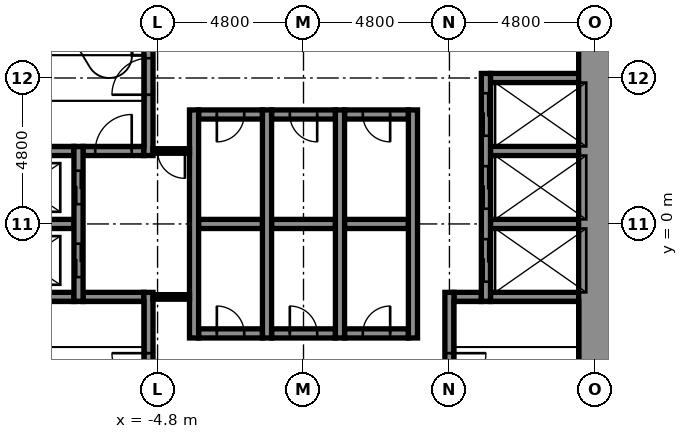
"""IFC4 building model, lengths in metres.
Left out: names, types, materials, properties, quantities, classifications, styles, units other than length and angle.
Written with IfcOpenShell. Run it as: python <this file> out.ifc"""

import sys

from ifc_helpers import new_model, si_unit, direction, frame, frame_2d, origin, place, context, subcontext, project, spatial, rectangle, extrude, element, fill, save


model = new_model("IFC4")
c1 = context("Model", 3, precision=1e-05, world=origin(), true_north=direction((0.0, 1.0)))
c2 = subcontext(c1, "Body", "Model", "MODEL_VIEW")
j1 = project(units=[si_unit("LENGTHUNIT", "METRE"), si_unit("PLANEANGLEUNIT", "RADIAN")], contexts=[c1])
p1 = place(None, origin())
s1 = spatial("IfcSite", under=j1, at=p1, CompositionType="ELEMENT")
p2 = place(p1, origin())
s2 = spatial("IfcBuilding", under=s1, at=p2, CompositionType="ELEMENT")
p3 = place(p2, origin())
s3 = spatial("IfcBuildingStorey", under=s2, at=p3, CompositionType="ELEMENT", Elevation=0.0)
p4 = place(p3, frame((-3.45, -3.6, -0.4), z_axis=(0.0, 0.0, 1.0), x_axis=(1.0, 0.0, 0.0)))
e1 = element("IfcWall", 1, at=p4, inside=s3, PredefinedType="STANDARD", context=c2, shape_type="SweptSolid", body=[
    extrude(rectangle(XDim=2.1, YDim=0.3, at=frame_2d((1.05, 0.0))), origin(), (0.0, 0.0, 1.0), 7.1),
])
p5 = place(p4, frame((0.6, 0.0, 0.4)))
e2 = element("IfcOpeningElement", 2, at=p5, cuts=e1, PredefinedType="OPENING", context=c2, shape_type="SweptSolid", body=[
    extrude(rectangle(XDim=0.9, YDim=2.1, at=frame_2d((0.45, 1.05))), frame((0.0, 0.16, 0.0), z_axis=(0.0, -1.0, 0.0), x_axis=(1.0, 0.0, 0.0)), (0.0, 0.0, 1.0), 0.32),
])
p6 = place(p3, frame((-1.05, -3.6, -0.4), z_axis=(0.0, 0.0, 1.0), x_axis=(1.0, 0.0, 0.0)))
e3 = element("IfcWall", 3, at=p6, inside=s3, PredefinedType="STANDARD", context=c2, shape_type="SweptSolid", body=[
    extrude(rectangle(XDim=2.1, YDim=0.3, at=frame_2d((1.05, 0.0))), origin(), (0.0, 0.0, 1.0), 7.1),
])
p7 = place(p6, frame((0.6, 0.0, 0.4)))
e4 = element("IfcOpeningElement", 4, at=p7, cuts=e3, PredefinedType="OPENING", context=c2, shape_type="SweptSolid", body=[
    extrude(rectangle(XDim=0.9, YDim=2.1, at=frame_2d((0.45, 1.05))), frame((0.0, 0.16, 0.0), z_axis=(0.0, -1.0, 0.0), x_axis=(1.0, 0.0, 0.0)), (0.0, 0.0, 1.0), 0.32),
])
p8 = place(p3, frame((1.35, -3.6, -0.4), z_axis=(0.0, 0.0, 1.0), x_axis=(1.0, 0.0, 0.0)))
e5 = element("IfcWall", 5, at=p8, inside=s3, PredefinedType="STANDARD", context=c2, shape_type="SweptSolid", body=[
    extrude(rectangle(XDim=2.1, YDim=0.3, at=frame_2d((1.05, 0.0))), origin(), (0.0, 0.0, 1.0), 7.1),
])
p9 = place(p8, frame((0.6, 0.0, 0.4)))
e6 = element("IfcOpeningElement", 6, at=p9, cuts=e5, PredefinedType="OPENING", context=c2, shape_type="SweptSolid", body=[
    extrude(rectangle(XDim=0.9, YDim=2.1, at=frame_2d((0.45, 1.05))), frame((0.0, 0.16, 0.0), z_axis=(0.0, -1.0, 0.0), x_axis=(1.0, 0.0, 0.0)), (0.0, 0.0, 1.0), 0.32),
])
p10 = place(p3, frame((-9.45, -2.4, -0.4), z_axis=(0.0, 0.0, 1.0), x_axis=(1.0, 0.0, 0.0)))
e7 = element("IfcWall", 7, at=p10, inside=s3, PredefinedType="STANDARD", context=c2, shape_type="SweptSolid", body=[
    extrude(rectangle(XDim=1.9, YDim=0.3, at=frame_2d((0.95, 0.0))), origin(), (0.0, 0.0, 1.0), 7.1),
])
p11 = place(p3, frame((-7.25, -2.4, -0.4), z_axis=(0.0, 0.0, 1.0), x_axis=(1.0, 0.0, 0.0)))
e8 = element("IfcWall", 8, at=p11, inside=s3, PredefinedType="STANDARD", context=c2, shape_type="SweptSolid", body=[
    extrude(rectangle(XDim=2.0, YDim=0.3, at=frame_2d((1.0, 0.0))), origin(), (0.0, 0.0, 1.0), 7.1),
])
p12 = place(p3, frame((4.95, -2.4, -0.4), z_axis=(0.0, 0.0, 1.0), x_axis=(1.0, 0.0, 0.0)))
e9 = element("IfcWall", 9, at=p12, inside=s3, PredefinedType="STANDARD", context=c2, shape_type="SweptSolid", body=[
    extrude(rectangle(XDim=0.9, YDim=0.3, at=frame_2d((0.45, 0.0))), origin(), (0.0, 0.0, 1.0), 7.1),
])
p13 = place(p3, frame((6.15, -2.4, -0.4), z_axis=(0.0, 0.0, 1.0), x_axis=(1.0, 0.0, 0.0)))
e10 = element("IfcWall", 10, at=p13, inside=s3, PredefinedType="STANDARD", context=c2, shape_type="SweptSolid", body=[
    extrude(rectangle(XDim=2.9, YDim=0.3, at=frame_2d((1.45, 0.0))), origin(), (0.0, 0.0, 1.0), 7.1),
])
p14 = place(p3, frame((-10.85, 0.0, -0.4), z_axis=(0.0, 0.0, 1.0), x_axis=(1.0, 0.0, 0.0)))
e11 = element("IfcWall", 11, at=p14, inside=s3, PredefinedType="STANDARD", context=c2, shape_type="SweptSolid", body=[
    extrude(rectangle(XDim=3.3, YDim=0.3, at=frame_2d((1.65, 0.0))), origin(), (0.0, 0.0, 1.0), 7.1),
])
p15 = place(p3, frame((-3.45, 0.0, -0.4), z_axis=(0.0, 0.0, 1.0), x_axis=(1.0, 0.0, 0.0)))
e12 = element("IfcWall", 12, at=p15, inside=s3, PredefinedType="STANDARD", context=c2, shape_type="SweptSolid", body=[
    extrude(rectangle(XDim=2.1, YDim=0.3, at=frame_2d((1.05, 0.0))), origin(), (0.0, 0.0, 1.0), 7.1),
])
p16 = place(p3, frame((-1.05, 0.0, -0.4), z_axis=(0.0, 0.0, 1.0), x_axis=(1.0, 0.0, 0.0)))
e13 = element("IfcWall", 13, at=p16, inside=s3, PredefinedType="STANDARD", context=c2, shape_type="SweptSolid", body=[
    extrude(rectangle(XDim=2.1, YDim=0.3, at=frame_2d((1.05, 0.0))), origin(), (0.0, 0.0, 1.0), 7.1),
])
p17 = place(p3, frame((1.35, 0.0, -0.4), z_axis=(0.0, 0.0, 1.0), x_axis=(1.0, 0.0, 0.0)))
e14 = element("IfcWall", 14, at=p17, inside=s3, PredefinedType="STANDARD", context=c2, shape_type="SweptSolid", body=[
    extrude(rectangle(XDim=2.1, YDim=0.3, at=frame_2d((1.05, 0.0))), origin(), (0.0, 0.0, 1.0), 7.1),
])
p18 = place(p3, frame((6.15, 0.0, -0.4), z_axis=(0.0, 0.0, 1.0), x_axis=(1.0, 0.0, 0.0)))
e15 = element("IfcWall", 15, at=p18, inside=s3, PredefinedType="STANDARD", context=c2, shape_type="SweptSolid", body=[
    extrude(rectangle(XDim=2.9, YDim=0.3, at=frame_2d((1.45, 0.0))), origin(), (0.0, 0.0, 1.0), 7.1),
])
p19 = place(p3, frame((-9.45, 2.4, -0.4), z_axis=(0.0, 0.0, 1.0), x_axis=(1.0, 0.0, 0.0)))
e16 = element("IfcWall", 16, at=p19, inside=s3, PredefinedType="STANDARD", context=c2, shape_type="SweptSolid", body=[
    extrude(rectangle(XDim=1.9, YDim=0.3, at=frame_2d((0.95, 0.0))), origin(), (0.0, 0.0, 1.0), 7.1),
])
p20 = place(p3, frame((-7.25, 2.4, -0.4), z_axis=(0.0, 0.0, 1.0), x_axis=(1.0, 0.0, 0.0)))
e17 = element("IfcWall", 17, at=p20, inside=s3, PredefinedType="STANDARD", context=c2, shape_type="SweptSolid", body=[
    extrude(rectangle(XDim=2.0, YDim=0.3, at=frame_2d((1.0, 0.0))), origin(), (0.0, 0.0, 1.0), 7.1),
])
p21 = place(p20, frame((0.4, 0.0, 0.4)))
e18 = element("IfcOpeningElement", 18, at=p21, cuts=e17, PredefinedType="OPENING", context=c2, shape_type="SweptSolid", body=[
    extrude(rectangle(XDim=1.2, YDim=2.1, at=frame_2d((0.6, 1.05))), frame((0.0, 0.16, 0.0), z_axis=(0.0, -1.0, 0.0), x_axis=(1.0, 0.0, 0.0)), (0.0, 0.0, 1.0), 0.32),
])
p22 = place(p3, frame((6.15, 2.4, -0.4), z_axis=(0.0, 0.0, 1.0), x_axis=(1.0, 0.0, 0.0)))
e19 = element("IfcWall", 19, at=p22, inside=s3, PredefinedType="STANDARD", context=c2, shape_type="SweptSolid", body=[
    extrude(rectangle(XDim=2.9, YDim=0.3, at=frame_2d((1.45, 0.0))), origin(), (0.0, 0.0, 1.0), 7.1),
])
p23 = place(p3, frame((-3.45, 3.6, -0.4), z_axis=(0.0, 0.0, 1.0), x_axis=(1.0, 0.0, 0.0)))
e20 = element("IfcWall", 20, at=p23, inside=s3, PredefinedType="STANDARD", context=c2, shape_type="SweptSolid", body=[
    extrude(rectangle(XDim=2.1, YDim=0.3, at=frame_2d((1.05, 0.0))), origin(), (0.0, 0.0, 1.0), 7.1),
])
p24 = place(p23, frame((0.6, 0.0, 0.4)))
e21 = element("IfcOpeningElement", 21, at=p24, cuts=e20, PredefinedType="OPENING", context=c2, shape_type="SweptSolid", body=[
    extrude(rectangle(XDim=0.9, YDim=2.1, at=frame_2d((0.45, 1.05))), frame((0.0, 0.16, 0.0), z_axis=(0.0, -1.0, 0.0), x_axis=(1.0, 0.0, 0.0)), (0.0, 0.0, 1.0), 0.32),
])
p25 = place(p3, frame((-1.05, 3.6, -0.4), z_axis=(0.0, 0.0, 1.0), x_axis=(1.0, 0.0, 0.0)))
e22 = element("IfcWall", 22, at=p25, inside=s3, PredefinedType="STANDARD", context=c2, shape_type="SweptSolid", body=[
    extrude(rectangle(XDim=2.1, YDim=0.3, at=frame_2d((1.05, 0.0))), origin(), (0.0, 0.0, 1.0), 7.1),
])
p26 = place(p25, frame((0.6, 0.0, 0.4)))
e23 = element("IfcOpeningElement", 23, at=p26, cuts=e22, PredefinedType="OPENING", context=c2, shape_type="SweptSolid", body=[
    extrude(rectangle(XDim=0.9, YDim=2.1, at=frame_2d((0.45, 1.05))), frame((0.0, 0.16, 0.0), z_axis=(0.0, -1.0, 0.0), x_axis=(1.0, 0.0, 0.0)), (0.0, 0.0, 1.0), 0.32),
])
p27 = place(p3, frame((1.35, 3.6, -0.4), z_axis=(0.0, 0.0, 1.0), x_axis=(1.0, 0.0, 0.0)))
e24 = element("IfcWall", 24, at=p27, inside=s3, PredefinedType="STANDARD", context=c2, shape_type="SweptSolid", body=[
    extrude(rectangle(XDim=2.1, YDim=0.3, at=frame_2d((1.05, 0.0))), origin(), (0.0, 0.0, 1.0), 7.1),
])
p28 = place(p27, frame((0.6, 0.0, 0.4)))
e25 = element("IfcOpeningElement", 25, at=p28, cuts=e24, PredefinedType="OPENING", context=c2, shape_type="SweptSolid", body=[
    extrude(rectangle(XDim=0.9, YDim=2.1, at=frame_2d((0.45, 1.05))), frame((0.0, 0.16, 0.0), z_axis=(0.0, -1.0, 0.0), x_axis=(1.0, 0.0, 0.0)), (0.0, 0.0, 1.0), 0.32),
])
p29 = place(p3, frame((6.15, 4.8, -0.4), z_axis=(0.0, 0.0, 1.0), x_axis=(1.0, 0.0, 0.0)))
e26 = element("IfcWall", 26, at=p29, inside=s3, PredefinedType="STANDARD", context=c2, shape_type="SweptSolid", body=[
    extrude(rectangle(XDim=2.9, YDim=0.3, at=frame_2d((1.45, 0.0))), origin(), (0.0, 0.0, 1.0), 7.1),
])
p30 = place(p3, frame((-7.4, -2.55, -0.4), z_axis=(0.0, 0.0, 1.0), x_axis=(0.0, 1.0, 0.0)))
e27 = element("IfcWall", 27, at=p30, inside=s3, PredefinedType="STANDARD", context=c2, shape_type="SweptSolid", body=[
    extrude(rectangle(XDim=5.1, YDim=0.3, at=frame_2d((2.55, 0.0))), origin(), (0.0, 0.0, 1.0), 7.1),
])
p31 = place(p30, frame((0.8, 0.0, 0.4)))
e28 = element("IfcOpeningElement", 28, at=p31, cuts=e27, PredefinedType="OPENING", context=c2, shape_type="SweptSolid", body=[
    extrude(rectangle(XDim=1.1, YDim=2.1, at=frame_2d((0.55, 1.05))), frame((0.0, 0.16, 0.0), z_axis=(0.0, -1.0, 0.0), x_axis=(1.0, 0.0, 0.0)), (0.0, 0.0, 1.0), 0.32),
])
p32 = place(p30, frame((3.2, 0.0, 0.4)))
e29 = element("IfcOpeningElement", 29, at=p32, cuts=e27, PredefinedType="OPENING", context=c2, shape_type="SweptSolid", body=[
    extrude(rectangle(XDim=1.1, YDim=2.1, at=frame_2d((0.55, 1.05))), frame((0.0, 0.16, 0.0), z_axis=(0.0, -1.0, 0.0), x_axis=(1.0, 0.0, 0.0)), (0.0, 0.0, 1.0), 0.32),
])
p33 = place(p3, frame((-5.1, -9.05, -0.4), z_axis=(0.0, 0.0, 1.0), x_axis=(0.0, 1.0, 0.0)))
e30 = element("IfcWall", 30, at=p33, inside=s3, PredefinedType="STANDARD", context=c2, shape_type="SweptSolid", body=[
    extrude(rectangle(XDim=6.8, YDim=0.3, at=frame_2d((3.4, 0.0))), origin(), (0.0, 0.0, 1.0), 7.1),
])
p34 = place(p33, frame((3.6, 0.0, 0.4)))
e31 = element("IfcOpeningElement", 31, at=p34, cuts=e30, PredefinedType="OPENING", context=c2, shape_type="SweptSolid", body=[
    extrude(rectangle(XDim=1.2, YDim=2.1, at=frame_2d((0.6, 1.05))), frame((0.0, 0.16, 0.0), z_axis=(0.0, -1.0, 0.0), x_axis=(1.0, 0.0, 0.0)), (0.0, 0.0, 1.0), 0.32),
])
p35 = place(p3, frame((-5.1, 2.25, -0.4), z_axis=(0.0, 0.0, 1.0), x_axis=(0.0, 1.0, 0.0)))
e32 = element("IfcWall", 32, at=p35, inside=s3, PredefinedType="STANDARD", context=c2, shape_type="SweptSolid", body=[
    extrude(rectangle(XDim=6.8, YDim=0.3, at=frame_2d((3.4, 0.0))), origin(), (0.0, 0.0, 1.0), 7.1),
])
p36 = place(p35, frame((2.0, 0.0, 0.4)))
e33 = element("IfcOpeningElement", 33, at=p36, cuts=e32, PredefinedType="OPENING", context=c2, shape_type="SweptSolid", body=[
    extrude(rectangle(XDim=1.2, YDim=2.1, at=frame_2d((0.6, 1.05))), frame((0.0, 0.16, 0.0), z_axis=(0.0, -1.0, 0.0), x_axis=(1.0, 0.0, 0.0)), (0.0, 0.0, 1.0), 0.32),
])
for number, where, z_axis, x_axis in (
    (34, (-3.6, -3.75, -0.4), (0.0, 0.0, 1.0), (0.0, 1.0, 0.0)),
    (35, (-1.2, -3.75, -0.4), (0.0, 0.0, 1.0), (0.0, 1.0, 0.0)),
    (36, (1.2, -3.75, -0.4), (0.0, 0.0, 1.0), (0.0, 1.0, 0.0)),
    (37, (3.6, -3.75, -0.4), (0.0, 0.0, 1.0), (0.0, 1.0, 0.0)),
):
    element("IfcWall", number, at=place(p3, frame(where, z_axis=z_axis, x_axis=x_axis)), inside=s3, PredefinedType="STANDARD", context=c2, shape_type="SweptSolid", body=[
        extrude(rectangle(XDim=7.5, YDim=0.3, at=frame_2d((3.75, 0.0))), origin(), (0.0, 0.0, 1.0), 7.1),
    ])
p37 = place(p3, frame((4.8, -9.05, -0.4), z_axis=(0.0, 0.0, 1.0), x_axis=(0.0, 1.0, 0.0)))
e38 = element("IfcWall", 38, at=p37, inside=s3, PredefinedType="STANDARD", context=c2, shape_type="SweptSolid", body=[
    extrude(rectangle(XDim=6.8, YDim=0.3, at=frame_2d((3.4, 0.0))), origin(), (0.0, 0.0, 1.0), 7.1),
])
p38 = place(p37, frame((3.6, 0.0, 0.4)))
e39 = element("IfcOpeningElement", 39, at=p38, cuts=e38, PredefinedType="OPENING", context=c2, shape_type="SweptSolid", body=[
    extrude(rectangle(XDim=1.2, YDim=2.1, at=frame_2d((0.6, 1.05))), frame((0.0, 0.16, 0.0), z_axis=(0.0, -1.0, 0.0), x_axis=(1.0, 0.0, 0.0)), (0.0, 0.0, 1.0), 0.32),
])
p39 = place(p3, frame((6.0, -2.55, -0.4), z_axis=(0.0, 0.0, 1.0), x_axis=(0.0, 1.0, 0.0)))
e40 = element("IfcWall", 40, at=p39, inside=s3, PredefinedType="STANDARD", context=c2, shape_type="SweptSolid", body=[
    extrude(rectangle(XDim=7.5, YDim=0.3, at=frame_2d((3.75, 0.0))), origin(), (0.0, 0.0, 1.0), 7.1),
])
p40 = place(p39, frame((0.65, 0.0, 0.4)))
e41 = element("IfcOpeningElement", 41, at=p40, cuts=e40, PredefinedType="OPENING", context=c2, shape_type="SweptSolid", body=[
    extrude(rectangle(XDim=1.4, YDim=2.1, at=frame_2d((0.7, 1.05))), frame((0.0, 0.16, 0.0), z_axis=(0.0, -1.0, 0.0), x_axis=(1.0, 0.0, 0.0)), (0.0, 0.0, 1.0), 0.32),
])
p41 = place(p39, frame((3.05, 0.0, 0.4)))
e42 = element("IfcOpeningElement", 42, at=p41, cuts=e40, PredefinedType="OPENING", context=c2, shape_type="SweptSolid", body=[
    extrude(rectangle(XDim=1.4, YDim=2.1, at=frame_2d((0.7, 1.05))), frame((0.0, 0.16, 0.0), z_axis=(0.0, -1.0, 0.0), x_axis=(1.0, 0.0, 0.0)), (0.0, 0.0, 1.0), 0.32),
])
p42 = place(p39, frame((5.45, 0.0, 0.4)))
e43 = element("IfcOpeningElement", 43, at=p42, cuts=e40, PredefinedType="OPENING", context=c2, shape_type="SweptSolid", body=[
    extrude(rectangle(XDim=1.4, YDim=2.1, at=frame_2d((0.7, 1.05))), frame((0.0, 0.16, 0.0), z_axis=(0.0, -1.0, 0.0), x_axis=(1.0, 0.0, 0.0)), (0.0, 0.0, 1.0), 0.32),
])
p43 = place(p3, frame((9.6, -10.15, -0.4), z_axis=(0.0, 0.0, 1.0), x_axis=(0.0, 1.0, 0.0)))
e44 = element("IfcWall", 44, at=p43, inside=s3, PredefinedType="SHEAR", context=c2, shape_type="SweptSolid", body=[
    extrude(rectangle(XDim=20.3, YDim=1.1, at=frame_2d((10.15, 0.0))), origin(), (0.0, 0.0, 1.0), 7.1),
])
p44 = place(p3, frame((-4.95, 2.4, 0.0), z_axis=(0.0, 0.0, 1.0), x_axis=(1.0, 0.0, 0.0)))
e45 = element("IfcWall", 45, at=p44, inside=s3, PredefinedType="PARTITIONING", context=c2, shape_type="SweptSolid", body=[
    extrude(rectangle(XDim=1.2, YDim=0.15, at=frame_2d((0.6, 0.0))), origin(), (0.0, 0.0, 1.0), 6.7),
])
p45 = place(p44, frame((0.15, 0.0, 0.0)))
e46 = element("IfcOpeningElement", 46, at=p45, cuts=e45, PredefinedType="OPENING", context=c2, shape_type="SweptSolid", body=[
    extrude(rectangle(XDim=0.9, YDim=2.1, at=frame_2d((0.45, 1.05))), frame((0.0, 0.085, 0.0), z_axis=(0.0, -1.0, 0.0), x_axis=(1.0, 0.0, 0.0)), (0.0, 0.0, 1.0), 0.17),
])
p46 = place(p3, frame((-4.95, -2.4, 0.0), z_axis=(0.0, 0.0, 1.0), x_axis=(1.0, 0.0, 0.0)))
e47 = element("IfcWall", 47, at=p46, inside=s3, PredefinedType="PARTITIONING", context=c2, shape_type="SweptSolid", body=[
    extrude(rectangle(XDim=1.2, YDim=0.15, at=frame_2d((0.6, 0.0))), origin(), (0.0, 0.0, 1.0), 6.7),
])
p47 = place(p31, origin())
e48 = element("IfcDoor", 48, at=p47, inside=s3, OperationType="DOUBLE_DOOR_SLIDING", PredefinedType="DOOR", context=c2, shape_type="SweptSolid", body=[
    extrude(rectangle(XDim=1.1, YDim=2.1, at=frame_2d((0.55, 1.05))), frame((0.0, 0.025, 0.0), z_axis=(0.0, -1.0, 0.0), x_axis=(1.0, 0.0, 0.0)), (0.0, 0.0, 1.0), 0.05),
])
fill(e28, e48)
p48 = place(p32, origin())
e49 = element("IfcDoor", 49, at=p48, inside=s3, OperationType="DOUBLE_DOOR_SLIDING", PredefinedType="DOOR", context=c2, shape_type="SweptSolid", body=[
    extrude(rectangle(XDim=1.1, YDim=2.1, at=frame_2d((0.55, 1.05))), frame((0.0, 0.025, 0.0), z_axis=(0.0, -1.0, 0.0), x_axis=(1.0, 0.0, 0.0)), (0.0, 0.0, 1.0), 0.05),
])
fill(e29, e49)
p49 = place(p40, origin())
e50 = element("IfcDoor", 50, at=p49, inside=s3, OperationType="DOUBLE_DOOR_SLIDING", PredefinedType="DOOR", context=c2, shape_type="SweptSolid", body=[
    extrude(rectangle(XDim=1.4, YDim=2.1, at=frame_2d((0.7, 1.05))), frame((0.0, 0.025, 0.0), z_axis=(0.0, -1.0, 0.0), x_axis=(1.0, 0.0, 0.0)), (0.0, 0.0, 1.0), 0.05),
])
fill(e41, e50)
p50 = place(p41, origin())
e51 = element("IfcDoor", 51, at=p50, inside=s3, OperationType="DOUBLE_DOOR_SLIDING", PredefinedType="DOOR", context=c2, shape_type="SweptSolid", body=[
    extrude(rectangle(XDim=1.4, YDim=2.1, at=frame_2d((0.7, 1.05))), frame((0.0, 0.025, 0.0), z_axis=(0.0, -1.0, 0.0), x_axis=(1.0, 0.0, 0.0)), (0.0, 0.0, 1.0), 0.05),
])
fill(e42, e51)
p51 = place(p42, origin())
e52 = element("IfcDoor", 52, at=p51, inside=s3, OperationType="DOUBLE_DOOR_SLIDING", PredefinedType="DOOR", context=c2, shape_type="SweptSolid", body=[
    extrude(rectangle(XDim=1.4, YDim=2.1, at=frame_2d((0.7, 1.05))), frame((0.0, 0.025, 0.0), z_axis=(0.0, -1.0, 0.0), x_axis=(1.0, 0.0, 0.0)), (0.0, 0.0, 1.0), 0.05),
])
fill(e43, e52)
p52 = place(p36, origin())
e53 = element("IfcDoor", 53, at=p52, inside=s3, OperationType="SINGLE_SWING_LEFT", PredefinedType="DOOR", context=c2, shape_type="SweptSolid", body=[
    extrude(rectangle(XDim=1.2, YDim=2.1, at=frame_2d((0.6, 1.05))), frame((0.0, 0.025, 0.0), z_axis=(0.0, -1.0, 0.0), x_axis=(1.0, 0.0, 0.0)), (0.0, 0.0, 1.0), 0.05),
])
fill(e33, e53)
p53 = place(p34, origin())
e54 = element("IfcDoor", 54, at=p53, inside=s3, OperationType="SINGLE_SWING_RIGHT", PredefinedType="DOOR", context=c2, shape_type="SweptSolid", body=[
    extrude(rectangle(XDim=1.2, YDim=2.1, at=frame_2d((0.6, 1.05))), frame((0.0, 0.025, 0.0), z_axis=(0.0, -1.0, 0.0), x_axis=(1.0, 0.0, 0.0)), (0.0, 0.0, 1.0), 0.05),
])
fill(e31, e54)
p54 = place(p38, frame((1.2, 0.0, 0.0), z_axis=(0.0, 0.0, 1.0), x_axis=(-1.0, 0.0, 0.0)))
e55 = element("IfcDoor", 55, at=p54, inside=s3, OperationType="SINGLE_SWING_RIGHT", PredefinedType="DOOR", context=c2, shape_type="SweptSolid", body=[
    extrude(rectangle(XDim=1.2, YDim=2.1, at=frame_2d((0.6, 1.05))), frame((0.0, 0.025, 0.0), z_axis=(0.0, -1.0, 0.0), x_axis=(1.0, 0.0, 0.0)), (0.0, 0.0, 1.0), 0.05),
])
fill(e39, e55)
p55 = place(p24, frame((0.9, 0.0, 0.0), z_axis=(0.0, 0.0, 1.0), x_axis=(-1.0, 0.0, 0.0)))
e56 = element("IfcDoor", 56, at=p55, inside=s3, OperationType="SINGLE_SWING_LEFT", PredefinedType="DOOR", context=c2, shape_type="SweptSolid", body=[
    extrude(rectangle(XDim=0.9, YDim=2.1, at=frame_2d((0.45, 1.05))), frame((0.0, 0.025, 0.0), z_axis=(0.0, -1.0, 0.0), x_axis=(1.0, 0.0, 0.0)), (0.0, 0.0, 1.0), 0.05),
])
fill(e21, e56)
p56 = place(p26, frame((0.9, 0.0, 0.0), z_axis=(0.0, 0.0, 1.0), x_axis=(-1.0, 0.0, 0.0)))
e57 = element("IfcDoor", 57, at=p56, inside=s3, OperationType="SINGLE_SWING_RIGHT", PredefinedType="DOOR", context=c2, shape_type="SweptSolid", body=[
    extrude(rectangle(XDim=0.9, YDim=2.1, at=frame_2d((0.45, 1.05))), frame((0.0, 0.025, 0.0), z_axis=(0.0, -1.0, 0.0), x_axis=(1.0, 0.0, 0.0)), (0.0, 0.0, 1.0), 0.05),
])
fill(e23, e57)
p57 = place(p28, frame((0.9, 0.0, 0.0), z_axis=(0.0, 0.0, 1.0), x_axis=(-1.0, 0.0, 0.0)))
e58 = element("IfcDoor", 58, at=p57, inside=s3, OperationType="SINGLE_SWING_RIGHT", PredefinedType="DOOR", context=c2, shape_type="SweptSolid", body=[
    extrude(rectangle(XDim=0.9, YDim=2.1, at=frame_2d((0.45, 1.05))), frame((0.0, 0.025, 0.0), z_axis=(0.0, -1.0, 0.0), x_axis=(1.0, 0.0, 0.0)), (0.0, 0.0, 1.0), 0.05),
])
fill(e25, e58)
p58 = place(p5, origin())
e59 = element("IfcDoor", 59, at=p58, inside=s3, OperationType="SINGLE_SWING_LEFT", PredefinedType="DOOR", context=c2, shape_type="SweptSolid", body=[
    extrude(rectangle(XDim=0.9, YDim=2.1, at=frame_2d((0.45, 1.05))), frame((0.0, 0.025, 0.0), z_axis=(0.0, -1.0, 0.0), x_axis=(1.0, 0.0, 0.0)), (0.0, 0.0, 1.0), 0.05),
])
fill(e2, e59)
p59 = place(p7, origin())
e60 = element("IfcDoor", 60, at=p59, inside=s3, OperationType="SINGLE_SWING_LEFT", PredefinedType="DOOR", context=c2, shape_type="SweptSolid", body=[
    extrude(rectangle(XDim=0.9, YDim=2.1, at=frame_2d((0.45, 1.05))), frame((0.0, 0.025, 0.0), z_axis=(0.0, -1.0, 0.0), x_axis=(1.0, 0.0, 0.0)), (0.0, 0.0, 1.0), 0.05),
])
fill(e4, e60)
p60 = place(p9, origin())
e61 = element("IfcDoor", 61, at=p60, inside=s3, OperationType="SINGLE_SWING_RIGHT", PredefinedType="DOOR", context=c2, shape_type="SweptSolid", body=[
    extrude(rectangle(XDim=0.9, YDim=2.1, at=frame_2d((0.45, 1.05))), frame((0.0, 0.025, 0.0), z_axis=(0.0, -1.0, 0.0), x_axis=(1.0, 0.0, 0.0)), (0.0, 0.0, 1.0), 0.05),
])
fill(e6, e61)
p61 = place(p45, frame((0.9, 0.0, 0.0), z_axis=(0.0, 0.0, 1.0), x_axis=(-1.0, 0.0, 0.0)))
e62 = element("IfcDoor", 62, at=p61, inside=s3, OperationType="SINGLE_SWING_RIGHT", PredefinedType="DOOR", context=c2, shape_type="SweptSolid", body=[
    extrude(rectangle(XDim=0.9, YDim=2.1, at=frame_2d((0.45, 1.05))), frame((0.0, 0.025, 0.0), z_axis=(0.0, -1.0, 0.0), x_axis=(1.0, 0.0, 0.0)), (0.0, 0.0, 1.0), 0.05),
])
fill(e46, e62)
p62 = place(p21, origin())
e63 = element("IfcDoor", 63, at=p62, inside=s3, OperationType="SINGLE_SWING_RIGHT", PredefinedType="DOOR", context=c2, shape_type="SweptSolid", body=[
    extrude(rectangle(XDim=1.2, YDim=2.1, at=frame_2d((0.6, 1.05))), frame((0.0, 0.025, 0.0), z_axis=(0.0, -1.0, 0.0), x_axis=(1.0, 0.0, 0.0)), (0.0, 0.0, 1.0), 0.05),
])
fill(e18, e63)
save(model, sys.argv[1])
